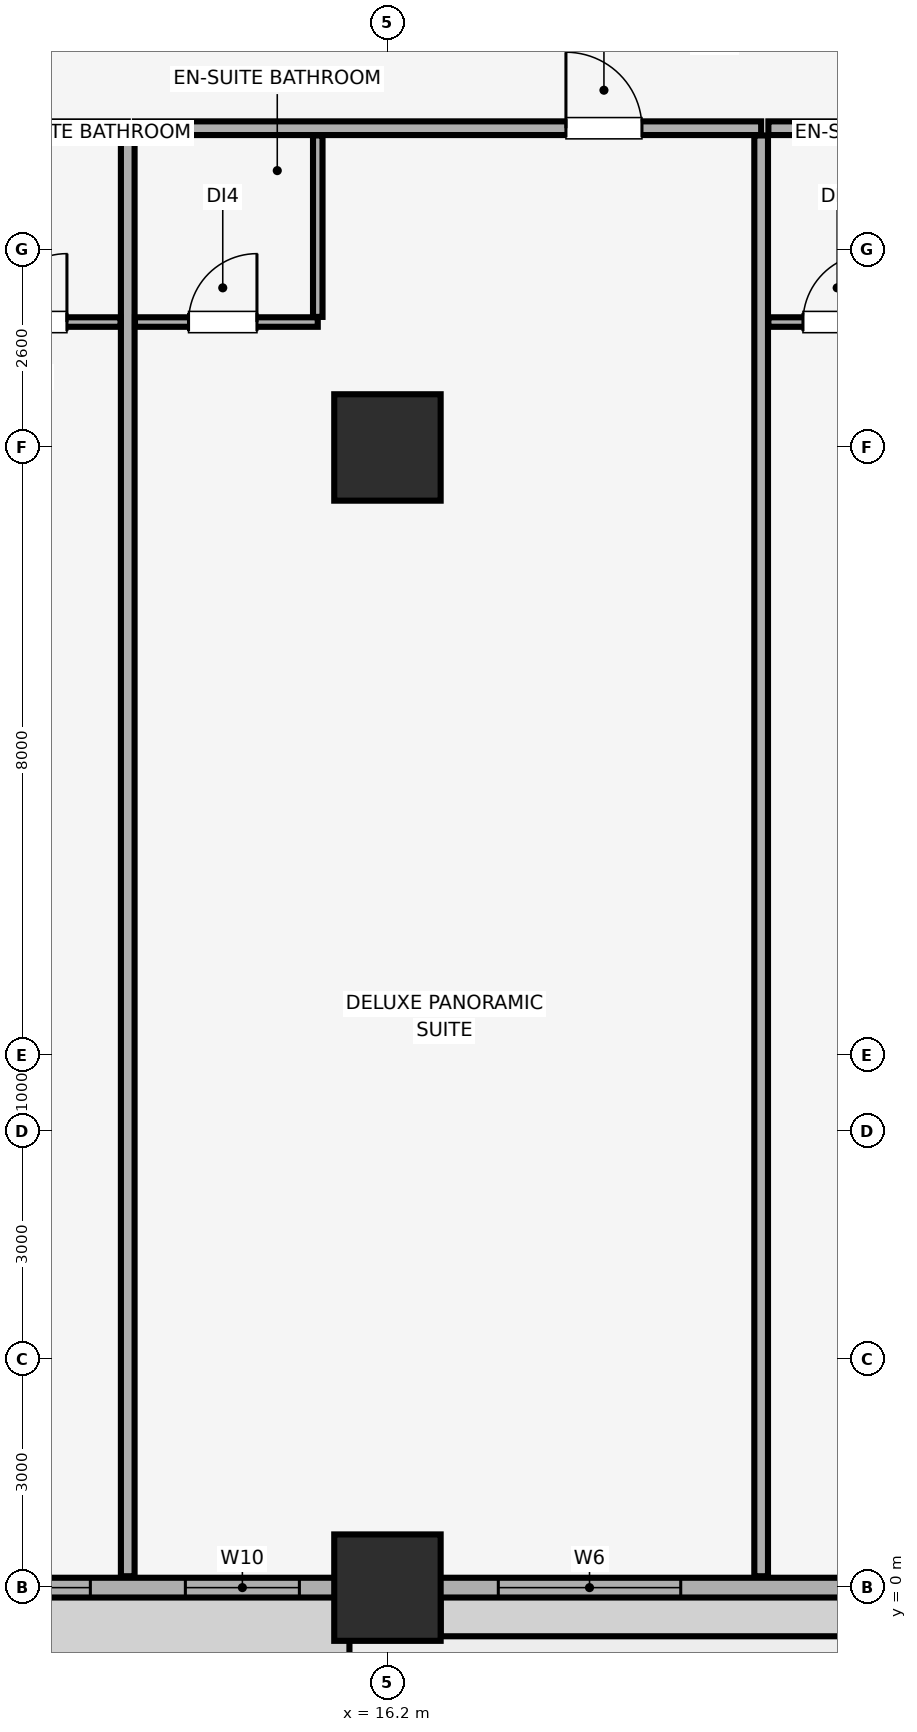
"""IFC4 building model, lengths in metres.
Left out: names, types, materials, properties, quantities, classifications, styles, units other than length and angle.
Written with IfcOpenShell. Run it as: python <this file> out.ifc"""

import sys

from ifc_helpers import new_model, si_unit, direction, frame, frame_2d, origin, origin_2d, place, context, subcontext, project, spatial, rectangle, extrude, element, fill, save


model = new_model("IFC4")
c1 = context("Model", 3, precision=1e-05, world=origin(), true_north=direction((0.0, 1.0)))
c2 = subcontext(c1, "Body", "Model", "MODEL_VIEW")
j1 = project(units=[si_unit("LENGTHUNIT", "METRE"), si_unit("PLANEANGLEUNIT", "RADIAN")], contexts=[c1])
p1 = place(None, origin())
s1 = spatial("IfcSite", under=j1, at=p1, CompositionType="ELEMENT")
p2 = place(p1, origin())
s2 = spatial("IfcBuilding", under=s1, at=p2, CompositionType="ELEMENT")
p3 = place(p2, frame((0.0, 0.0, 72.65)))
s3 = spatial("IfcBuildingStorey", under=s2, at=p3, CompositionType="ELEMENT", Elevation=72.65)
for number, where, z_axis, x_axis in (
    (1, (16.2, 0.0, 0.0), (0.0, 0.0, 1.0), (1.0, 0.0, 0.0)),
    (2, (16.2, 15.0, 0.0), (0.0, 0.0, 1.0), (1.0, 0.0, 0.0)),
):
    element("IfcColumn", number, at=place(p3, frame(where, z_axis=z_axis, x_axis=x_axis)), inside=s3, PredefinedType="COLUMN", context=c2, shape_type="SweptSolid", body=[
        extrude(rectangle(XDim=1.4, YDim=1.4, at=origin_2d()), origin(), (0.0, 0.0, 1.0), 3.51),
    ])
p4 = place(p3, frame((4.2, 0.0, 0.0), z_axis=(0.0, 0.0, 1.0), x_axis=(1.0, 0.0, 0.0)))
e3 = element("IfcWall", 3, at=p4, inside=s3, PredefinedType="SOLIDWALL", context=c2, shape_type="SweptSolid", body=[
    extrude(rectangle(XDim=75.6, YDim=0.26, at=frame_2d((37.8, 0.0))), origin(), (0.0, 0.0, 1.0), 2.56),
])
p5 = place(p4, frame((21.383, 0.0, 0.0)))
e4 = element("IfcOpeningElement", 4, at=p5, cuts=e3, PredefinedType="OPENING", context=c2, shape_type="SweptSolid", body=[
    extrude(rectangle(XDim=1.1, YDim=2.15, at=frame_2d((0.55, 1.075))), frame((0.0, 0.14, 0.0), z_axis=(0.0, -1.0, 0.0), x_axis=(1.0, 0.0, 0.0)), (0.0, 0.0, 1.0), 0.28),
])
p6 = place(p4, frame((37.25, 0.0, 0.0)))
e5 = element("IfcOpeningElement", 5, at=p6, cuts=e3, PredefinedType="OPENING", context=c2, shape_type="SweptSolid", body=[
    extrude(rectangle(XDim=1.1, YDim=2.15, at=frame_2d((0.55, 1.075))), frame((0.0, 0.14, 0.0), z_axis=(0.0, -1.0, 0.0), x_axis=(1.0, 0.0, 0.0)), (0.0, 0.0, 1.0), 0.28),
])
p7 = place(p4, frame((53.117, 0.0, 0.0)))
e6 = element("IfcOpeningElement", 6, at=p7, cuts=e3, PredefinedType="OPENING", context=c2, shape_type="SweptSolid", body=[
    extrude(rectangle(XDim=1.1, YDim=2.15, at=frame_2d((0.55, 1.075))), frame((0.0, 0.14, 0.0), z_axis=(0.0, -1.0, 0.0), x_axis=(1.0, 0.0, 0.0)), (0.0, 0.0, 1.0), 0.28),
])
p8 = place(p4, frame((1.035, 0.0, 0.85)))
e7 = element("IfcOpeningElement", 7, at=p8, cuts=e3, PredefinedType="OPENING", context=c2, shape_type="SweptSolid", body=[
    extrude(rectangle(XDim=2.4, YDim=1.5, at=frame_2d((1.2, 0.75))), frame((0.0, 0.14, 0.0), z_axis=(0.0, -1.0, 0.0), x_axis=(1.0, 0.0, 0.0)), (0.0, 0.0, 1.0), 0.28),
])
p9 = place(p4, frame((5.691, 0.0, 0.85)))
e8 = element("IfcOpeningElement", 8, at=p9, cuts=e3, PredefinedType="OPENING", context=c2, shape_type="SweptSolid", body=[
    extrude(rectangle(XDim=2.4, YDim=1.5, at=frame_2d((1.2, 0.75))), frame((0.0, 0.14, 0.0), z_axis=(0.0, -1.0, 0.0), x_axis=(1.0, 0.0, 0.0)), (0.0, 0.0, 1.0), 0.28),
])
p10 = place(p4, frame((9.342, 0.0, 0.85)))
e9 = element("IfcOpeningElement", 9, at=p10, cuts=e3, PredefinedType="OPENING", context=c2, shape_type="SweptSolid", body=[
    extrude(rectangle(XDim=1.5, YDim=1.4, at=frame_2d((0.75, 0.7))), frame((0.0, 0.14, 0.0), z_axis=(0.0, -1.0, 0.0), x_axis=(1.0, 0.0, 0.0)), (0.0, 0.0, 1.0), 0.28),
])
p11 = place(p4, frame((13.458, 0.0, 0.85)))
e10 = element("IfcOpeningElement", 10, at=p11, cuts=e3, PredefinedType="OPENING", context=c2, shape_type="SweptSolid", body=[
    extrude(rectangle(XDim=2.4, YDim=1.5, at=frame_2d((1.2, 0.75))), frame((0.0, 0.14, 0.0), z_axis=(0.0, -1.0, 0.0), x_axis=(1.0, 0.0, 0.0)), (0.0, 0.0, 1.0), 0.28),
])
p12 = place(p4, frame((23.202, 0.0, 0.85)))
e11 = element("IfcOpeningElement", 11, at=p12, cuts=e3, PredefinedType="OPENING", context=c2, shape_type="SweptSolid", body=[
    extrude(rectangle(XDim=1.5, YDim=1.4, at=frame_2d((0.75, 0.7))), frame((0.0, 0.14, 0.0), z_axis=(0.0, -1.0, 0.0), x_axis=(1.0, 0.0, 0.0)), (0.0, 0.0, 1.0), 0.28),
])
p13 = place(p4, frame((28.8, 0.0, 0.85)))
e12 = element("IfcOpeningElement", 12, at=p13, cuts=e3, PredefinedType="OPENING", context=c2, shape_type="SweptSolid", body=[
    extrude(rectangle(XDim=2.4, YDim=1.5, at=frame_2d((1.2, 0.75))), frame((0.0, 0.14, 0.0), z_axis=(0.0, -1.0, 0.0), x_axis=(1.0, 0.0, 0.0)), (0.0, 0.0, 1.0), 0.28),
])
p14 = place(p4, frame((34.79, 0.0, 0.85)))
e13 = element("IfcOpeningElement", 13, at=p14, cuts=e3, PredefinedType="OPENING", context=c2, shape_type="SweptSolid", body=[
    extrude(rectangle(XDim=1.5, YDim=1.4, at=frame_2d((0.75, 0.7))), frame((0.0, 0.14, 0.0), z_axis=(0.0, -1.0, 0.0), x_axis=(1.0, 0.0, 0.0)), (0.0, 0.0, 1.0), 0.28),
])
p15 = place(p4, frame((39.31, 0.0, 0.85)))
e14 = element("IfcOpeningElement", 14, at=p15, cuts=e3, PredefinedType="OPENING", context=c2, shape_type="SweptSolid", body=[
    extrude(rectangle(XDim=1.5, YDim=1.4, at=frame_2d((0.75, 0.7))), frame((0.0, 0.14, 0.0), z_axis=(0.0, -1.0, 0.0), x_axis=(1.0, 0.0, 0.0)), (0.0, 0.0, 1.0), 0.28),
])
p16 = place(p4, frame((44.4, 0.0, 0.85)))
e15 = element("IfcOpeningElement", 15, at=p16, cuts=e3, PredefinedType="OPENING", context=c2, shape_type="SweptSolid", body=[
    extrude(rectangle(XDim=2.4, YDim=1.5, at=frame_2d((1.2, 0.75))), frame((0.0, 0.14, 0.0), z_axis=(0.0, -1.0, 0.0), x_axis=(1.0, 0.0, 0.0)), (0.0, 0.0, 1.0), 0.28),
])
p17 = place(p4, frame((50.848, 0.0, 0.85)))
e16 = element("IfcOpeningElement", 16, at=p17, cuts=e3, PredefinedType="OPENING", context=c2, shape_type="SweptSolid", body=[
    extrude(rectangle(XDim=1.5, YDim=1.4, at=frame_2d((0.75, 0.7))), frame((0.0, 0.14, 0.0), z_axis=(0.0, -1.0, 0.0), x_axis=(1.0, 0.0, 0.0)), (0.0, 0.0, 1.0), 0.28),
])
p18 = place(p4, frame((59.691, 0.0, 0.85)))
e17 = element("IfcOpeningElement", 17, at=p18, cuts=e3, PredefinedType="OPENING", context=c2, shape_type="SweptSolid", body=[
    extrude(rectangle(XDim=2.4, YDim=1.5, at=frame_2d((1.2, 0.75))), frame((0.0, 0.14, 0.0), z_axis=(0.0, -1.0, 0.0), x_axis=(1.0, 0.0, 0.0)), (0.0, 0.0, 1.0), 0.28),
])
p19 = place(p4, frame((64.708, 0.0, 0.85)))
e18 = element("IfcOpeningElement", 18, at=p19, cuts=e3, PredefinedType="OPENING", context=c2, shape_type="SweptSolid", body=[
    extrude(rectangle(XDim=1.5, YDim=1.4, at=frame_2d((0.75, 0.7))), frame((0.0, 0.14, 0.0), z_axis=(0.0, -1.0, 0.0), x_axis=(1.0, 0.0, 0.0)), (0.0, 0.0, 1.0), 0.28),
])
p20 = place(p4, frame((67.458, 0.0, 0.85)))
e19 = element("IfcOpeningElement", 19, at=p20, cuts=e3, PredefinedType="OPENING", context=c2, shape_type="SweptSolid", body=[
    extrude(rectangle(XDim=2.4, YDim=1.5, at=frame_2d((1.2, 0.75))), frame((0.0, 0.14, 0.0), z_axis=(0.0, -1.0, 0.0), x_axis=(1.0, 0.0, 0.0)), (0.0, 0.0, 1.0), 0.28),
])
p21 = place(p4, frame((72.165, 0.0, 0.85)))
e20 = element("IfcOpeningElement", 20, at=p21, cuts=e3, PredefinedType="OPENING", context=c2, shape_type="SweptSolid", body=[
    extrude(rectangle(XDim=2.4, YDim=1.5, at=frame_2d((1.2, 0.75))), frame((0.0, 0.14, 0.0), z_axis=(0.0, -1.0, 0.0), x_axis=(1.0, 0.0, 0.0)), (0.0, 0.0, 1.0), 0.28),
])
p22 = place(p3, frame((0.15, 19.2, 0.0), z_axis=(0.0, 0.0, 1.0), x_axis=(1.0, 0.0, 0.0)))
e21 = element("IfcWall", 21, at=p22, inside=s3, PredefinedType="PARTITIONING", context=c2, shape_type="SweptSolid", body=[
    extrude(rectangle(XDim=12.633, YDim=0.18, at=frame_2d((6.317, 0.0))), origin(), (0.0, 0.0, 1.0), 3.51),
])
p23 = place(p22, frame((5.685, 0.0, 0.0)))
e22 = element("IfcOpeningElement", 22, at=p23, cuts=e21, PredefinedType="OPENING", context=c2, shape_type="SweptSolid", body=[
    extrude(rectangle(XDim=1.0, YDim=2.15, at=frame_2d((0.5, 1.075))), frame((0.0, 0.1, 0.0), z_axis=(0.0, -1.0, 0.0), x_axis=(1.0, 0.0, 0.0)), (0.0, 0.0, 1.0), 0.2),
])
p24 = place(p3, frame((12.783, 0.15, 0.0), z_axis=(0.0, 0.0, 1.0), x_axis=(0.0, 1.0, 0.0)))
e23 = element("IfcWall", 23, at=p24, inside=s3, PredefinedType="PARTITIONING", context=c2, shape_type="SweptSolid", body=[
    extrude(rectangle(XDim=18.955, YDim=0.18, at=frame_2d((9.478, 0.0))), origin(), (0.0, 0.0, 1.0), 2.898),
])
p25 = place(p3, frame((10.283, 16.65, 0.0), z_axis=(0.0, 0.0, 1.0), x_axis=(1.0, 0.0, 0.0)))
e24 = element("IfcWall", 24, at=p25, inside=s3, PredefinedType="PARTITIONING", context=c2, shape_type="SweptSolid", body=[
    extrude(rectangle(XDim=2.405, YDim=0.125, at=frame_2d((1.203, 0.0))), origin(), (0.0, 0.0, 1.0), 3.51),
])
p26 = place(p25, frame((0.8, 0.0, 0.0)))
e25 = element("IfcOpeningElement", 25, at=p26, cuts=e24, PredefinedType="OPENING", context=c2, shape_type="SweptSolid", body=[
    extrude(rectangle(XDim=0.9, YDim=2.1, at=frame_2d((0.45, 1.05))), frame((0.0, 0.073, 0.0), z_axis=(0.0, -1.0, 0.0), x_axis=(1.0, 0.0, 0.0)), (0.0, 0.0, 1.0), 0.145),
])
p27 = place(p3, frame((12.878, 19.2, 0.0), z_axis=(0.0, 0.0, 1.0), x_axis=(1.0, 0.0, 0.0)))
e26 = element("IfcWall", 26, at=p27, inside=s3, PredefinedType="PARTITIONING", context=c2, shape_type="SweptSolid", body=[
    extrude(rectangle(XDim=8.238, YDim=0.18, at=frame_2d((4.119, 0.0))), origin(), (0.0, 0.0, 1.0), 3.51),
])
p28 = place(p27, frame((5.67, 0.0, 0.0)))
e27 = element("IfcOpeningElement", 27, at=p28, cuts=e26, PredefinedType="OPENING", context=c2, shape_type="SweptSolid", body=[
    extrude(rectangle(XDim=1.0, YDim=2.15, at=frame_2d((0.5, 1.075))), frame((0.0, 0.1, 0.0), z_axis=(0.0, -1.0, 0.0), x_axis=(1.0, 0.0, 0.0)), (0.0, 0.0, 1.0), 0.2),
])
p29 = place(p3, frame((21.117, 0.15, 0.0), z_axis=(0.0, 0.0, 1.0), x_axis=(0.0, 1.0, 0.0)))
e28 = element("IfcWall", 28, at=p29, inside=s3, PredefinedType="PARTITIONING", context=c2, shape_type="SweptSolid", body=[
    extrude(rectangle(XDim=18.955, YDim=0.18, at=frame_2d((9.478, 0.0))), origin(), (0.0, 0.0, 1.0), 3.51),
])
p30 = place(p3, frame((12.878, 16.65, 0.0), z_axis=(0.0, 0.0, 1.0), x_axis=(1.0, 0.0, 0.0)))
e29 = element("IfcWall", 29, at=p30, inside=s3, PredefinedType="PARTITIONING", context=c2, shape_type="SweptSolid", body=[
    extrude(rectangle(XDim=2.405, YDim=0.125, at=frame_2d((1.202, 0.0))), origin(), (0.0, 0.0, 1.0), 3.51),
])
p31 = place(p30, frame((0.705, 0.0, 0.0)))
e30 = element("IfcOpeningElement", 30, at=p31, cuts=e29, PredefinedType="OPENING", context=c2, shape_type="SweptSolid", body=[
    extrude(rectangle(XDim=0.9, YDim=2.1, at=frame_2d((0.45, 1.05))), frame((0.0, 0.073, 0.0), z_axis=(0.0, -1.0, 0.0), x_axis=(1.0, 0.0, 0.0)), (0.0, 0.0, 1.0), 0.145),
])
p32 = place(p3, frame((15.283, 16.718, 0.0), z_axis=(0.0, 0.0, 1.0), x_axis=(0.0, 1.0, 0.0)))
e31 = element("IfcWall", 31, at=p32, inside=s3, PredefinedType="PARTITIONING", context=c2, shape_type="SweptSolid", body=[
    extrude(rectangle(XDim=2.387, YDim=0.125, at=frame_2d((1.194, 0.0))), origin(), (0.0, 0.0, 1.0), 3.51),
])
p33 = place(p3, frame((21.212, 19.2, 0.0), z_axis=(0.0, 0.0, 1.0), x_axis=(1.0, 0.0, 0.0)))
e32 = element("IfcWall", 32, at=p33, inside=s3, PredefinedType="PARTITIONING", context=c2, shape_type="SweptSolid", body=[
    extrude(rectangle(XDim=8.238, YDim=0.18, at=frame_2d((4.119, 0.0))), origin(), (0.0, 0.0, 1.0), 3.51),
])
p34 = place(p33, frame((5.271, 0.0, 0.0)))
e33 = element("IfcOpeningElement", 33, at=p34, cuts=e32, PredefinedType="OPENING", context=c2, shape_type="SweptSolid", body=[
    extrude(rectangle(XDim=1.0, YDim=2.15, at=frame_2d((0.5, 1.075))), frame((0.0, 0.1, 0.0), z_axis=(0.0, -1.0, 0.0), x_axis=(1.0, 0.0, 0.0)), (0.0, 0.0, 1.0), 0.2),
])
p35 = place(p3, frame((21.212, 16.65, 0.0), z_axis=(0.0, 0.0, 1.0), x_axis=(1.0, 0.0, 0.0)))
e34 = element("IfcWall", 34, at=p35, inside=s3, PredefinedType="PARTITIONING", context=c2, shape_type="SweptSolid", body=[
    extrude(rectangle(XDim=2.405, YDim=0.125, at=frame_2d((1.203, 0.0))), origin(), (0.0, 0.0, 1.0), 3.51),
])
p36 = place(p35, frame((0.455, 0.0, 0.0)))
e35 = element("IfcOpeningElement", 35, at=p36, cuts=e34, PredefinedType="OPENING", context=c2, shape_type="SweptSolid", body=[
    extrude(rectangle(XDim=0.9, YDim=2.1, at=frame_2d((0.45, 1.05))), frame((0.0, 0.073, 0.0), z_axis=(0.0, -1.0, 0.0), x_axis=(1.0, 0.0, 0.0)), (0.0, 0.0, 1.0), 0.145),
])
p37 = place(p9, origin())
e36 = element("IfcWindow", 36, at=p37, inside=s3, PartitioningType="SINGLE_PANEL", PredefinedType="WINDOW", context=c2, shape_type="SweptSolid", body=[
    extrude(rectangle(XDim=2.4, YDim=1.5, at=frame_2d((1.2, 0.75))), frame((0.0, 0.03, 0.0), z_axis=(0.0, -1.0, 0.0), x_axis=(1.0, 0.0, 0.0)), (0.0, 0.0, 1.0), 0.06),
])
fill(e8, e36)
p38 = place(p10, origin())
e37 = element("IfcWindow", 37, at=p38, inside=s3, PartitioningType="SINGLE_PANEL", PredefinedType="WINDOW", context=c2, shape_type="SweptSolid", body=[
    extrude(rectangle(XDim=1.5, YDim=1.4, at=frame_2d((0.75, 0.7))), frame((0.0, 0.03, 0.0), z_axis=(0.0, -1.0, 0.0), x_axis=(1.0, 0.0, 0.0)), (0.0, 0.0, 1.0), 0.06),
])
fill(e9, e37)
p39 = place(p11, origin())
e38 = element("IfcWindow", 38, at=p39, inside=s3, PartitioningType="SINGLE_PANEL", PredefinedType="WINDOW", context=c2, shape_type="SweptSolid", body=[
    extrude(rectangle(XDim=2.4, YDim=1.5, at=frame_2d((1.2, 0.75))), frame((0.0, 0.03, 0.0), z_axis=(0.0, -1.0, 0.0), x_axis=(1.0, 0.0, 0.0)), (0.0, 0.0, 1.0), 0.06),
])
fill(e10, e38)
p40 = place(p26, origin())
e39 = element("IfcDoor", 39, at=p40, inside=s3, OperationType="SINGLE_SWING_RIGHT", PredefinedType="DOOR", context=c2, shape_type="SweptSolid", body=[
    extrude(rectangle(XDim=0.9, YDim=2.1, at=frame_2d((0.45, 1.05))), frame((0.0, 0.025, 0.0), z_axis=(0.0, -1.0, 0.0), x_axis=(1.0, 0.0, 0.0)), (0.0, 0.0, 1.0), 0.05),
])
fill(e25, e39)
p41 = place(p28, origin())
e40 = element("IfcDoor", 40, at=p41, inside=s3, OperationType="SINGLE_SWING_LEFT", PredefinedType="DOOR", context=c2, shape_type="SweptSolid", body=[
    extrude(rectangle(XDim=1.0, YDim=2.15, at=frame_2d((0.5, 1.075))), frame((0.0, 0.025, 0.0), z_axis=(0.0, -1.0, 0.0), x_axis=(1.0, 0.0, 0.0)), (0.0, 0.0, 1.0), 0.05),
])
fill(e27, e40)
p42 = place(p31, origin())
e41 = element("IfcDoor", 41, at=p42, inside=s3, OperationType="SINGLE_SWING_RIGHT", PredefinedType="DOOR", context=c2, shape_type="SweptSolid", body=[
    extrude(rectangle(XDim=0.9, YDim=2.1, at=frame_2d((0.45, 1.05))), frame((0.0, 0.025, 0.0), z_axis=(0.0, -1.0, 0.0), x_axis=(1.0, 0.0, 0.0)), (0.0, 0.0, 1.0), 0.05),
])
fill(e30, e41)
p43 = place(p36, origin())
e42 = element("IfcDoor", 42, at=p43, inside=s3, OperationType="SINGLE_SWING_RIGHT", PredefinedType="DOOR", context=c2, shape_type="SweptSolid", body=[
    extrude(rectangle(XDim=0.9, YDim=2.1, at=frame_2d((0.45, 1.05))), frame((0.0, 0.025, 0.0), z_axis=(0.0, -1.0, 0.0), x_axis=(1.0, 0.0, 0.0)), (0.0, 0.0, 1.0), 0.05),
])
fill(e35, e42)
save(model, sys.argv[1])
